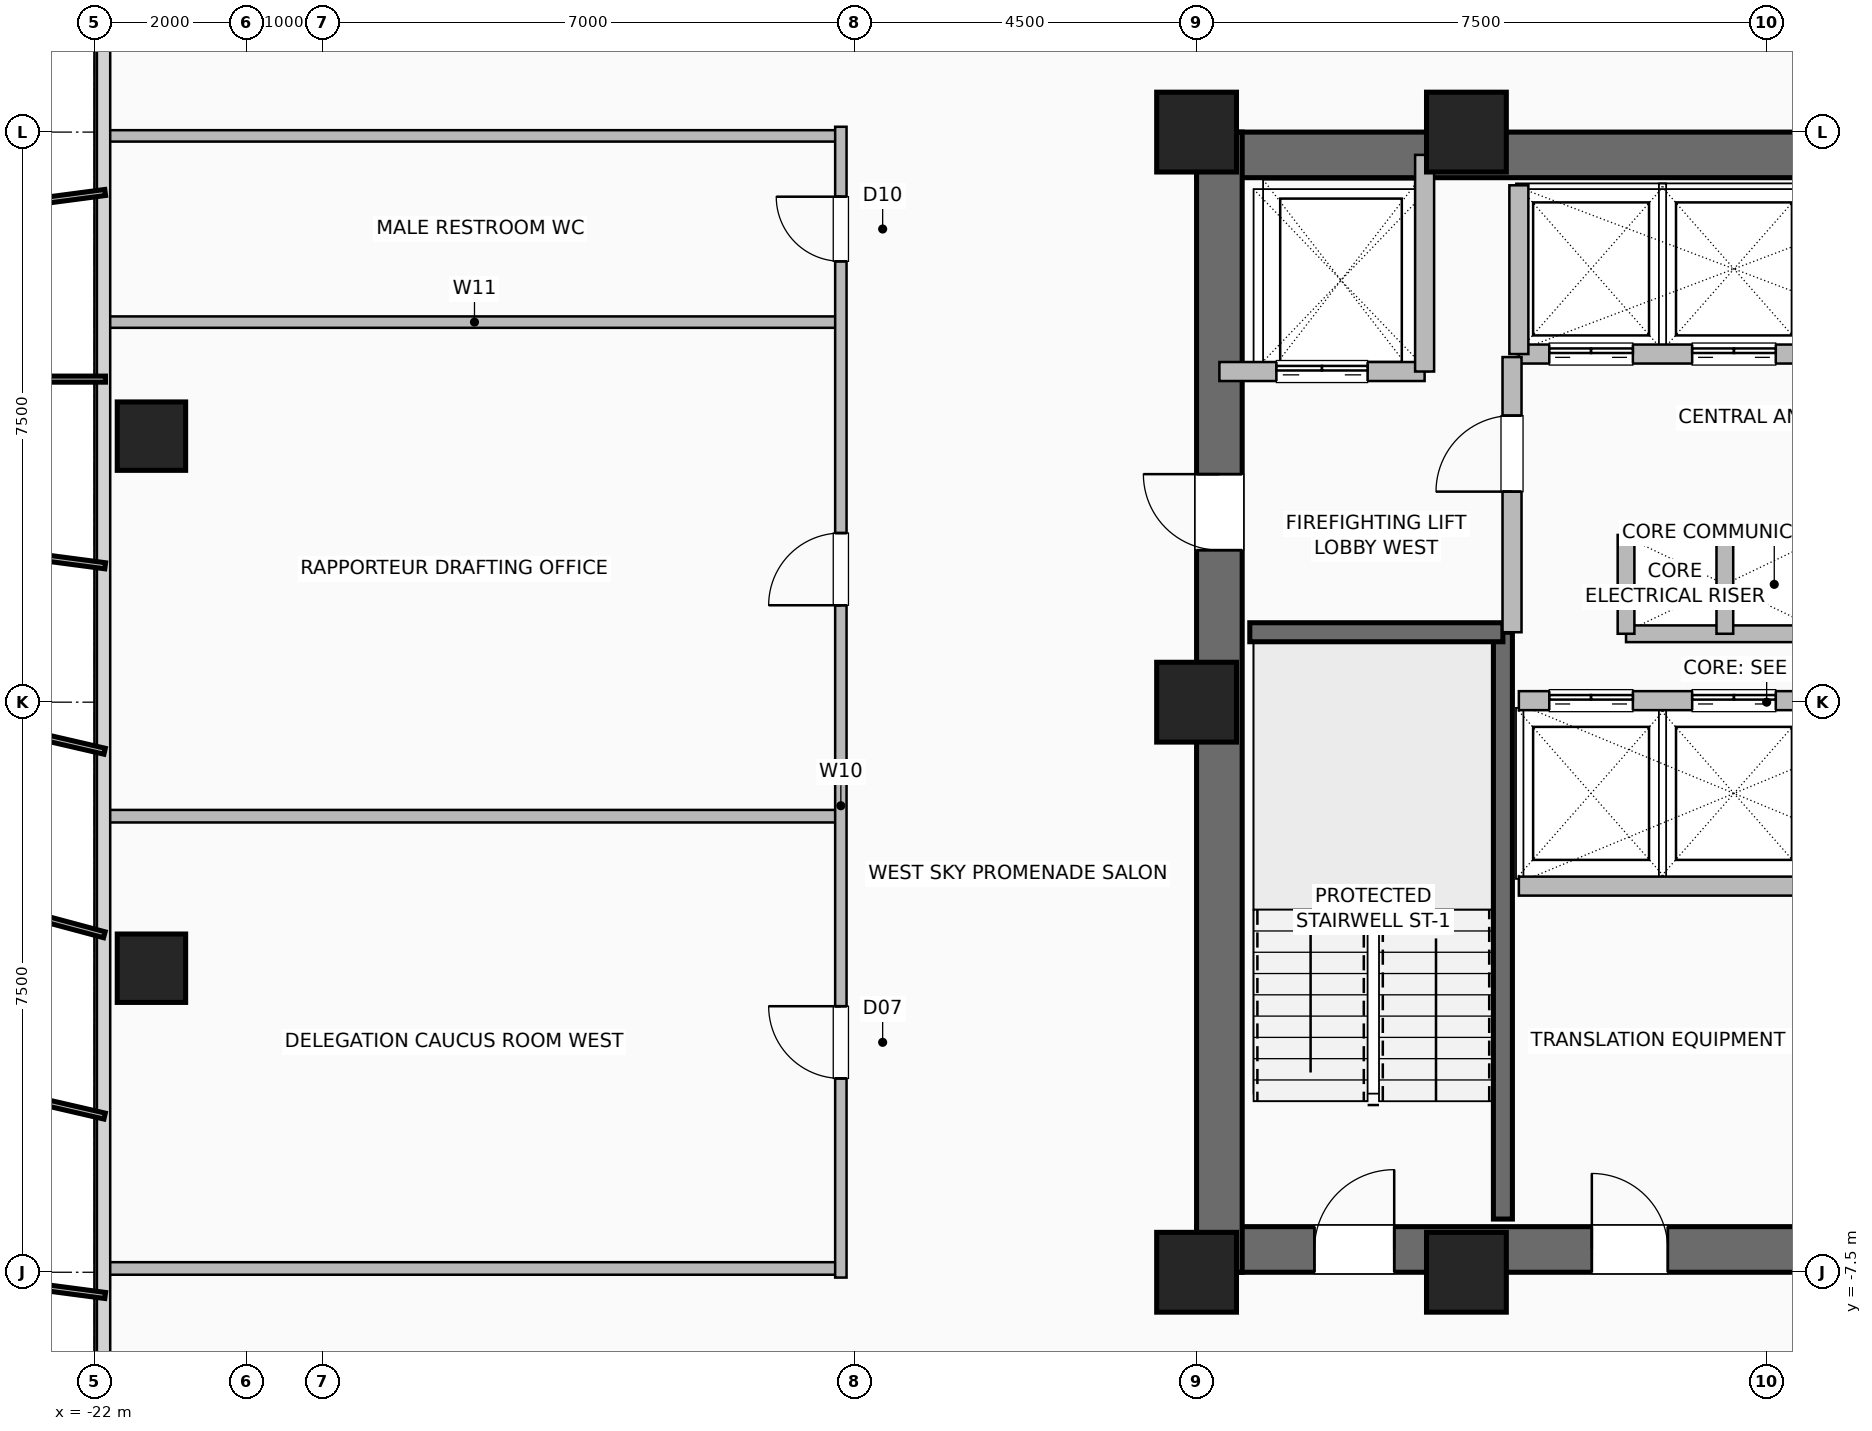
"""IFC4 building model, lengths in metres.
Left out: names, types, materials, properties, quantities, classifications, styles, units other than length and angle.
Written with IfcOpenShell. Run it as: python <this file> out.ifc"""

import sys

from ifc_helpers import new_model, si_unit, direction, frame, frame_2d, origin, origin_2d, place, context, subcontext, project, spatial, rectangle, hollow_rectangle, extrude, element, fill, save


model = new_model("IFC4")
c1 = context("Model", 3, precision=1e-05, world=origin(), true_north=direction((0.0, 1.0)))
c2 = subcontext(c1, "Body", "Model", "MODEL_VIEW")
j1 = project(units=[si_unit("LENGTHUNIT", "METRE"), si_unit("PLANEANGLEUNIT", "RADIAN")], contexts=[c1])
p1 = place(None, origin())
s1 = spatial("IfcSite", under=j1, at=p1, CompositionType="ELEMENT")
p2 = place(p1, origin())
s2 = spatial("IfcBuilding", under=s1, at=p2, CompositionType="ELEMENT")
p3 = place(p2, frame((0.0, 0.0, 104.8)))
s3 = spatial("IfcBuildingStorey", under=s2, at=p3, CompositionType="ELEMENT", Elevation=104.8)
for number, where, z_axis, x_axis in (
    (1, (-7.5, -7.5, 0.0), (0.0, 0.0, 1.0), (1.0, 0.0, 0.0)),
    (2, (-3.95, -7.5, 0.0), (0.0, 0.0, 1.0), (1.0, 0.0, 0.0)),
    (3, (-3.95, 7.5, 0.0), (0.0, 0.0, 1.0), (1.0, 0.0, 0.0)),
    (4, (-7.5, 7.5, 0.0), (0.0, 0.0, 1.0), (1.0, 0.0, 0.0)),
    (5, (-7.5, 0.0, 0.0), (0.0, 0.0, 1.0), (1.0, 0.0, 0.0)),
):
    element("IfcColumn", number, at=place(p3, frame(where, z_axis=z_axis, x_axis=x_axis)), inside=s3, PredefinedType="COLUMN", context=c2, shape_type="SweptSolid", body=[
        extrude(hollow_rectangle(XDim=1.05, YDim=1.05, WallThickness=0.05, at=origin_2d()), origin(), (0.0, 0.0, 1.0), 3.6),
    ])
for number, where, z_axis, x_axis in (
    (6, (-21.25, -3.5, 0.0), (0.0, 0.0, 1.0), (1.0, 0.0, 0.0)),
    (7, (-21.25, 3.5, 0.0), (0.0, 0.0, 1.0), (1.0, 0.0, 0.0)),
):
    element("IfcColumn", number, at=place(p3, frame(where, z_axis=z_axis, x_axis=x_axis)), inside=s3, PredefinedType="COLUMN", context=c2, shape_type="SweptSolid", body=[
        extrude(hollow_rectangle(XDim=0.9, YDim=0.9, WallThickness=0.045, at=origin_2d()), origin(), (0.0, 0.0, 1.0), 3.6),
    ])
p4 = place(p3, frame((-7.5, -7.2, 0.0), z_axis=(0.0, 0.0, 1.0), x_axis=(1.0, 0.0, 0.0)))
e8 = element("IfcWall", 8, at=p4, inside=s3, PredefinedType="SHEAR", context=c2, shape_type="SweptSolid", body=[
    extrude(rectangle(XDim=15.0, YDim=0.6, at=frame_2d((7.5, 0.0))), origin(), (0.0, 0.0, 1.0), 3.36),
])
p5 = place(p4, frame((1.55, 0.0, 0.0)))
e9 = element("IfcOpeningElement", 9, at=p5, cuts=e8, PredefinedType="OPENING", context=c2, shape_type="SweptSolid", body=[
    extrude(rectangle(XDim=1.05, YDim=2.08, at=frame_2d((0.525, 1.04))), frame((0.0, 0.31, 0.0), z_axis=(0.0, -1.0, 0.0), x_axis=(1.0, 0.0, 0.0)), (0.0, 0.0, 1.0), 0.62),
])
p6 = place(p4, frame((12.4, 0.0, 0.0)))
e10 = element("IfcOpeningElement", 10, at=p6, cuts=e8, PredefinedType="OPENING", context=c2, shape_type="SweptSolid", body=[
    extrude(rectangle(XDim=1.05, YDim=2.08, at=frame_2d((0.525, 1.04))), frame((0.0, 0.31, 0.0), z_axis=(0.0, -1.0, 0.0), x_axis=(1.0, 0.0, 0.0)), (0.0, 0.0, 1.0), 0.62),
])
p7 = place(p4, frame((5.2, 0.0, 0.0)))
e11 = element("IfcOpeningElement", 11, at=p7, cuts=e8, PredefinedType="OPENING", context=c2, shape_type="SweptSolid", body=[
    extrude(rectangle(XDim=1.0, YDim=2.08, at=frame_2d((0.5, 1.04))), frame((0.0, 0.31, 0.0), z_axis=(0.0, -1.0, 0.0), x_axis=(1.0, 0.0, 0.0)), (0.0, 0.0, 1.0), 0.62),
])
p8 = place(p4, frame((8.65, 0.0, 0.0)))
e12 = element("IfcOpeningElement", 12, at=p8, cuts=e8, PredefinedType="OPENING", context=c2, shape_type="SweptSolid", body=[
    extrude(rectangle(XDim=1.0, YDim=2.08, at=frame_2d((0.5, 1.04))), frame((0.0, 0.31, 0.0), z_axis=(0.0, -1.0, 0.0), x_axis=(1.0, 0.0, 0.0)), (0.0, 0.0, 1.0), 0.62),
])
p9 = place(p3, frame((-7.5, 7.2, 0.0), z_axis=(0.0, 0.0, 1.0), x_axis=(1.0, 0.0, 0.0)))
e13 = element("IfcWall", 13, at=p9, inside=s3, PredefinedType="SHEAR", context=c2, shape_type="SweptSolid", body=[
    extrude(rectangle(XDim=15.0, YDim=0.6, at=frame_2d((7.5, 0.0))), origin(), (0.0, 0.0, 1.0), 3.36),
])
p10 = place(p3, frame((-7.2, -7.5, 0.0), z_axis=(0.0, 0.0, 1.0), x_axis=(0.0, 1.0, 0.0)))
e14 = element("IfcWall", 14, at=p10, inside=s3, PredefinedType="SHEAR", context=c2, shape_type="SweptSolid", body=[
    extrude(rectangle(XDim=15.0, YDim=0.6, at=frame_2d((7.5, 0.0))), origin(), (0.0, 0.0, 1.0), 3.36),
])
p11 = place(p10, frame((9.5, 0.0, 0.0)))
e15 = element("IfcOpeningElement", 15, at=p11, cuts=e14, PredefinedType="OPENING", context=c2, shape_type="SweptSolid", body=[
    extrude(rectangle(XDim=1.0, YDim=2.08, at=frame_2d((0.5, 1.04))), frame((0.0, 0.31, 0.0), z_axis=(0.0, -1.0, 0.0), x_axis=(1.0, 0.0, 0.0)), (0.0, 0.0, 1.0), 0.62),
])
p12 = place(p3, frame((-3.47, -6.8, 0.0), z_axis=(0.0, 0.0, 1.0), x_axis=(0.0, 1.0, 0.0)))
e16 = element("IfcWall", 16, at=p12, inside=s3, PredefinedType="SHEAR", context=c2, shape_type="SweptSolid", body=[
    extrude(rectangle(XDim=7.72, YDim=0.25, at=frame_2d((3.86, 0.0))), origin(), (0.0, 0.0, 1.0), 3.36),
])
p13 = place(p3, frame((-6.8, 0.92, 0.0), z_axis=(0.0, 0.0, 1.0), x_axis=(1.0, 0.0, 0.0)))
e17 = element("IfcWall", 17, at=p13, inside=s3, PredefinedType="SHEAR", context=c2, shape_type="SweptSolid", body=[
    extrude(rectangle(XDim=3.33, YDim=0.25, at=frame_2d((1.665, 0.0))), origin(), (0.0, 0.0, 1.0), 3.36),
])
for number, where, z_axis, x_axis in (
    (18, (-1.85, 2.2, 0.0), (0.0, 0.0, 1.0), (1.0, 0.0, 0.0)),
    (19, (-1.85, 0.9, 0.0), (0.0, 0.0, 1.0), (1.0, 0.0, 0.0)),
):
    element("IfcWall", number, at=place(p3, frame(where, z_axis=z_axis, x_axis=x_axis)), inside=s3, PredefinedType="PARTITIONING", context=c2, shape_type="SweptSolid", body=[
        extrude(rectangle(XDim=2.6, YDim=0.22, at=frame_2d((1.3, 0.0))), origin(), (0.0, 0.0, 1.0), 3.36),
    ])
for number, where, z_axis, x_axis in (
    (20, (-0.55, 0.9, 0.0), (0.0, 0.0, 1.0), (0.0, 1.0, 0.0)),
    (21, (-1.85, 0.9, 0.0), (0.0, 0.0, 1.0), (0.0, 1.0, 0.0)),
):
    element("IfcWall", number, at=place(p3, frame(where, z_axis=z_axis, x_axis=x_axis)), inside=s3, PredefinedType="PARTITIONING", context=c2, shape_type="SweptSolid", body=[
        extrude(rectangle(XDim=1.3, YDim=0.22, at=frame_2d((0.65, 0.0))), origin(), (0.0, 0.0, 1.0), 3.36),
    ])
p14 = place(p3, frame((-3.26, 0.02, 0.0), z_axis=(0.0, 0.0, 1.0), x_axis=(1.0, 0.0, 0.0)))
e22 = element("IfcWall", 22, at=p14, inside=s3, PredefinedType="SHEAR", context=c2, shape_type="SweptSolid", body=[
    extrude(rectangle(XDim=5.64, YDim=0.25, at=frame_2d((2.82, 0.0))), origin(), (0.0, 0.0, 1.0), 3.36),
])
p15 = place(p14, frame((0.4, 0.0, 0.0)))
e23 = element("IfcOpeningElement", 23, at=p15, cuts=e22, PredefinedType="OPENING", context=c2, shape_type="SweptSolid", body=[
    extrude(rectangle(XDim=1.1, YDim=2.2, at=frame_2d((0.55, 1.1))), frame((0.0, 0.135, 0.0), z_axis=(0.0, -1.0, 0.0), x_axis=(1.0, 0.0, 0.0)), (0.0, 0.0, 1.0), 0.27),
])
p16 = place(p14, frame((2.28, 0.0, 0.0)))
e24 = element("IfcOpeningElement", 24, at=p16, cuts=e22, PredefinedType="OPENING", context=c2, shape_type="SweptSolid", body=[
    extrude(rectangle(XDim=1.1, YDim=2.2, at=frame_2d((0.55, 1.1))), frame((0.0, 0.135, 0.0), z_axis=(0.0, -1.0, 0.0), x_axis=(1.0, 0.0, 0.0)), (0.0, 0.0, 1.0), 0.27),
])
p17 = place(p14, frame((4.16, 0.0, 0.0)))
e25 = element("IfcOpeningElement", 25, at=p17, cuts=e22, PredefinedType="OPENING", context=c2, shape_type="SweptSolid", body=[
    extrude(rectangle(XDim=1.1, YDim=2.2, at=frame_2d((0.55, 1.1))), frame((0.0, 0.135, 0.0), z_axis=(0.0, -1.0, 0.0), x_axis=(1.0, 0.0, 0.0)), (0.0, 0.0, 1.0), 0.27),
])
p18 = place(p3, frame((-3.26, -2.42, 0.0), z_axis=(0.0, 0.0, 1.0), x_axis=(1.0, 0.0, 0.0)))
e26 = element("IfcWall", 26, at=p18, inside=s3, PredefinedType="SHEAR", context=c2, shape_type="SweptSolid", body=[
    extrude(rectangle(XDim=5.64, YDim=0.25, at=frame_2d((2.82, 0.0))), origin(), (0.0, 0.0, 1.0), 3.36),
])
p19 = place(p3, frame((-3.26, 4.58, 0.0), z_axis=(0.0, 0.0, 1.0), x_axis=(1.0, 0.0, 0.0)))
e27 = element("IfcWall", 27, at=p19, inside=s3, PredefinedType="SHEAR", context=c2, shape_type="SweptSolid", body=[
    extrude(rectangle(XDim=5.64, YDim=0.25, at=frame_2d((2.82, 0.0))), origin(), (0.0, 0.0, 1.0), 3.36),
])
p20 = place(p19, frame((0.4, 0.0, 0.0)))
e28 = element("IfcOpeningElement", 28, at=p20, cuts=e27, PredefinedType="OPENING", context=c2, shape_type="SweptSolid", body=[
    extrude(rectangle(XDim=1.1, YDim=2.2, at=frame_2d((0.55, 1.1))), frame((0.0, 0.135, 0.0), z_axis=(0.0, -1.0, 0.0), x_axis=(1.0, 0.0, 0.0)), (0.0, 0.0, 1.0), 0.27),
])
p21 = place(p19, frame((2.28, 0.0, 0.0)))
e29 = element("IfcOpeningElement", 29, at=p21, cuts=e27, PredefinedType="OPENING", context=c2, shape_type="SweptSolid", body=[
    extrude(rectangle(XDim=1.1, YDim=2.2, at=frame_2d((0.55, 1.1))), frame((0.0, 0.135, 0.0), z_axis=(0.0, -1.0, 0.0), x_axis=(1.0, 0.0, 0.0)), (0.0, 0.0, 1.0), 0.27),
])
p22 = place(p19, frame((4.16, 0.0, 0.0)))
e30 = element("IfcOpeningElement", 30, at=p22, cuts=e27, PredefinedType="OPENING", context=c2, shape_type="SweptSolid", body=[
    extrude(rectangle(XDim=1.1, YDim=2.2, at=frame_2d((0.55, 1.1))), frame((0.0, 0.135, 0.0), z_axis=(0.0, -1.0, 0.0), x_axis=(1.0, 0.0, 0.0)), (0.0, 0.0, 1.0), 0.27),
])
p23 = place(p3, frame((-3.26, 4.58, 0.0), z_axis=(0.0, 0.0, 1.0), x_axis=(0.0, 1.0, 0.0)))
e31 = element("IfcWall", 31, at=p23, inside=s3, PredefinedType="SHEAR", context=c2, shape_type="SweptSolid", body=[
    extrude(rectangle(XDim=2.22, YDim=0.25, at=frame_2d((1.11, 0.0))), origin(), (0.0, 0.0, 1.0), 3.36),
])
p24 = place(p3, frame((-7.2, 4.35, 0.0), z_axis=(0.0, 0.0, 1.0), x_axis=(1.0, 0.0, 0.0)))
e32 = element("IfcWall", 32, at=p24, inside=s3, PredefinedType="SHEAR", context=c2, shape_type="SweptSolid", body=[
    extrude(rectangle(XDim=2.7, YDim=0.25, at=frame_2d((1.35, 0.0))), origin(), (0.0, 0.0, 1.0), 3.36),
])
p25 = place(p24, frame((0.75, 0.0, 0.0)))
e33 = element("IfcOpeningElement", 33, at=p25, cuts=e32, PredefinedType="OPENING", context=c2, shape_type="SweptSolid", body=[
    extrude(rectangle(XDim=1.2, YDim=2.2, at=frame_2d((0.6, 1.1))), frame((0.0, 0.135, 0.0), z_axis=(0.0, -1.0, 0.0), x_axis=(1.0, 0.0, 0.0)), (0.0, 0.0, 1.0), 0.27),
])
p26 = place(p3, frame((-4.5, 4.35, 0.0), z_axis=(0.0, 0.0, 1.0), x_axis=(0.0, 1.0, 0.0)))
e34 = element("IfcWall", 34, at=p26, inside=s3, PredefinedType="SHEAR", context=c2, shape_type="SweptSolid", body=[
    extrude(rectangle(XDim=2.85, YDim=0.25, at=frame_2d((1.425, 0.0))), origin(), (0.0, 0.0, 1.0), 3.36),
])
p27 = place(p3, frame((-3.35, 0.92, 0.0), z_axis=(0.0, 0.0, 1.0), x_axis=(0.0, 1.0, 0.0)))
e35 = element("IfcWall", 35, at=p27, inside=s3, PredefinedType="SHEAR", context=c2, shape_type="SweptSolid", body=[
    extrude(rectangle(XDim=3.62, YDim=0.25, at=frame_2d((1.81, 0.0))), origin(), (0.0, 0.0, 1.0), 3.36),
])
p28 = place(p27, frame((1.85, 0.0, 0.0)))
e36 = element("IfcOpeningElement", 36, at=p28, cuts=e35, PredefinedType="OPENING", context=c2, shape_type="SweptSolid", body=[
    extrude(rectangle(XDim=1.0, YDim=2.08, at=frame_2d((0.5, 1.04))), frame((0.0, 0.135, 0.0), z_axis=(0.0, -1.0, 0.0), x_axis=(1.0, 0.0, 0.0)), (0.0, 0.0, 1.0), 0.27),
])
for number, where, z_axis, x_axis in (
    (37, (-21.82, -7.45, 0.0), (0.0, 0.0, 1.0), (1.0, 0.0, 0.0)),
    (38, (-21.82, -1.5, 0.0), (0.0, 0.0, 1.0), (1.0, 0.0, 0.0)),
):
    element("IfcWall", number, at=place(p3, frame(where, z_axis=z_axis, x_axis=x_axis)), inside=s3, PredefinedType="PLUMBINGWALL", context=c2, shape_type="SweptSolid", body=[
        extrude(rectangle(XDim=9.64, YDim=0.165, at=frame_2d((4.82, 0.0))), origin(), (0.0, 0.0, 1.0), 3.36),
    ])
for number, where, z_axis, x_axis in (
    (39, (-21.82, 5.0, 0.0), (0.0, 0.0, 1.0), (1.0, 0.0, 0.0)),
    (40, (-21.82, 7.45, 0.0), (0.0, 0.0, 1.0), (1.0, 0.0, 0.0)),
):
    element("IfcWall", number, at=place(p3, frame(where, z_axis=z_axis, x_axis=x_axis)), inside=s3, PredefinedType="PARTITIONING", context=c2, shape_type="SweptSolid", body=[
        extrude(rectangle(XDim=9.64, YDim=0.15, at=frame_2d((4.82, 0.0))), origin(), (0.0, 0.0, 1.0), 3.36),
    ])
p29 = place(p3, frame((-12.18, -7.57, 0.0), z_axis=(0.0, 0.0, 1.0), x_axis=(0.0, 1.0, 0.0)))
e41 = element("IfcWall", 41, at=p29, inside=s3, PredefinedType="PARTITIONING", context=c2, shape_type="SweptSolid", body=[
    extrude(rectangle(XDim=15.14, YDim=0.15, at=frame_2d((7.57, 0.0))), origin(), (0.0, 0.0, 1.0), 3.36),
])
p30 = place(p29, frame((2.62, 0.0, 0.0)))
e42 = element("IfcOpeningElement", 42, at=p30, cuts=e41, PredefinedType="OPENING", context=c2, shape_type="SweptSolid", body=[
    extrude(rectangle(XDim=0.95, YDim=2.06, at=frame_2d((0.475, 1.03))), frame((0.0, 0.085, 0.0), z_axis=(0.0, -1.0, 0.0), x_axis=(1.0, 0.0, 0.0)), (0.0, 0.0, 1.0), 0.17),
])
p31 = place(p29, frame((8.845, 0.0, 0.0)))
e43 = element("IfcOpeningElement", 43, at=p31, cuts=e41, PredefinedType="OPENING", context=c2, shape_type="SweptSolid", body=[
    extrude(rectangle(XDim=0.95, YDim=2.06, at=frame_2d((0.475, 1.03))), frame((0.0, 0.085, 0.0), z_axis=(0.0, -1.0, 0.0), x_axis=(1.0, 0.0, 0.0)), (0.0, 0.0, 1.0), 0.17),
])
p32 = place(p29, frame((13.37, 0.0, 0.0)))
e44 = element("IfcOpeningElement", 44, at=p32, cuts=e41, PredefinedType="OPENING", context=c2, shape_type="SweptSolid", body=[
    extrude(rectangle(XDim=0.85, YDim=2.05, at=frame_2d((0.425, 1.025))), frame((0.0, 0.085, 0.0), z_axis=(0.0, -1.0, 0.0), x_axis=(1.0, 0.0, 0.0)), (0.0, 0.0, 1.0), 0.17),
])
p33 = place(p5, origin())
e45 = element("IfcDoor", 45, at=p33, inside=s3, OperationType="SINGLE_SWING_RIGHT", PredefinedType="DOOR", context=c2, shape_type="SweptSolid", body=[
    extrude(rectangle(XDim=1.05, YDim=2.08, at=frame_2d((0.525, 1.04))), frame((0.0, 0.025, 0.0), z_axis=(0.0, -1.0, 0.0), x_axis=(1.0, 0.0, 0.0)), (0.0, 0.0, 1.0), 0.05),
])
fill(e9, e45)
p34 = place(p11, origin())
e46 = element("IfcDoor", 46, at=p34, inside=s3, OperationType="SINGLE_SWING_RIGHT", PredefinedType="DOOR", context=c2, shape_type="SweptSolid", body=[
    extrude(rectangle(XDim=1.0, YDim=2.08, at=frame_2d((0.5, 1.04))), frame((0.0, 0.025, 0.0), z_axis=(0.0, -1.0, 0.0), x_axis=(1.0, 0.0, 0.0)), (0.0, 0.0, 1.0), 0.05),
])
fill(e15, e46)
p35 = place(p7, origin())
e47 = element("IfcDoor", 47, at=p35, inside=s3, OperationType="SINGLE_SWING_LEFT", PredefinedType="DOOR", context=c2, shape_type="SweptSolid", body=[
    extrude(rectangle(XDim=1.0, YDim=2.08, at=frame_2d((0.5, 1.04))), frame((0.0, 0.025, 0.0), z_axis=(0.0, -1.0, 0.0), x_axis=(1.0, 0.0, 0.0)), (0.0, 0.0, 1.0), 0.05),
])
fill(e11, e47)
p36 = place(p15, origin())
e48 = element("IfcDoor", 48, at=p36, inside=s3, OperationType="DOUBLE_DOOR_SLIDING", PredefinedType="DOOR", context=c2, shape_type="SweptSolid", body=[
    extrude(rectangle(XDim=1.1, YDim=2.2, at=frame_2d((0.55, 1.1))), frame((0.0, 0.025, 0.0), z_axis=(0.0, -1.0, 0.0), x_axis=(1.0, 0.0, 0.0)), (0.0, 0.0, 1.0), 0.05),
])
fill(e23, e48)
p37 = place(p16, origin())
e49 = element("IfcDoor", 49, at=p37, inside=s3, OperationType="DOUBLE_DOOR_SLIDING", PredefinedType="DOOR", context=c2, shape_type="SweptSolid", body=[
    extrude(rectangle(XDim=1.1, YDim=2.2, at=frame_2d((0.55, 1.1))), frame((0.0, 0.025, 0.0), z_axis=(0.0, -1.0, 0.0), x_axis=(1.0, 0.0, 0.0)), (0.0, 0.0, 1.0), 0.05),
])
fill(e24, e49)
p38 = place(p20, origin())
e50 = element("IfcDoor", 50, at=p38, inside=s3, OperationType="DOUBLE_DOOR_SLIDING", PredefinedType="DOOR", context=c2, shape_type="SweptSolid", body=[
    extrude(rectangle(XDim=1.1, YDim=2.2, at=frame_2d((0.55, 1.1))), frame((0.0, 0.025, 0.0), z_axis=(0.0, -1.0, 0.0), x_axis=(1.0, 0.0, 0.0)), (0.0, 0.0, 1.0), 0.05),
])
fill(e28, e50)
p39 = place(p21, origin())
e51 = element("IfcDoor", 51, at=p39, inside=s3, OperationType="DOUBLE_DOOR_SLIDING", PredefinedType="DOOR", context=c2, shape_type="SweptSolid", body=[
    extrude(rectangle(XDim=1.1, YDim=2.2, at=frame_2d((0.55, 1.1))), frame((0.0, 0.025, 0.0), z_axis=(0.0, -1.0, 0.0), x_axis=(1.0, 0.0, 0.0)), (0.0, 0.0, 1.0), 0.05),
])
fill(e29, e51)
p40 = place(p25, origin())
e52 = element("IfcDoor", 52, at=p40, inside=s3, OperationType="DOUBLE_DOOR_SLIDING", PredefinedType="DOOR", context=c2, shape_type="SweptSolid", body=[
    extrude(rectangle(XDim=1.2, YDim=2.2, at=frame_2d((0.6, 1.1))), frame((0.0, 0.025, 0.0), z_axis=(0.0, -1.0, 0.0), x_axis=(1.0, 0.0, 0.0)), (0.0, 0.0, 1.0), 0.05),
])
fill(e33, e52)
p41 = place(p28, origin())
e53 = element("IfcDoor", 53, at=p41, inside=s3, OperationType="SINGLE_SWING_LEFT", PredefinedType="DOOR", context=c2, shape_type="SweptSolid", body=[
    extrude(rectangle(XDim=1.0, YDim=2.08, at=frame_2d((0.5, 1.04))), frame((0.0, 0.025, 0.0), z_axis=(0.0, -1.0, 0.0), x_axis=(1.0, 0.0, 0.0)), (0.0, 0.0, 1.0), 0.05),
])
fill(e36, e53)
p42 = place(p30, origin())
e54 = element("IfcDoor", 54, at=p42, inside=s3, OperationType="SINGLE_SWING_RIGHT", PredefinedType="DOOR", context=c2, shape_type="SweptSolid", body=[
    extrude(rectangle(XDim=0.95, YDim=2.06, at=frame_2d((0.475, 1.03))), frame((0.0, 0.025, 0.0), z_axis=(0.0, -1.0, 0.0), x_axis=(1.0, 0.0, 0.0)), (0.0, 0.0, 1.0), 0.05),
])
fill(e42, e54)
p43 = place(p31, origin())
e55 = element("IfcDoor", 55, at=p43, inside=s3, OperationType="SINGLE_SWING_LEFT", PredefinedType="DOOR", context=c2, shape_type="SweptSolid", body=[
    extrude(rectangle(XDim=0.95, YDim=2.06, at=frame_2d((0.475, 1.03))), frame((0.0, 0.025, 0.0), z_axis=(0.0, -1.0, 0.0), x_axis=(1.0, 0.0, 0.0)), (0.0, 0.0, 1.0), 0.05),
])
fill(e43, e55)
p44 = place(p32, origin())
e56 = element("IfcDoor", 56, at=p44, inside=s3, OperationType="SINGLE_SWING_RIGHT", PredefinedType="DOOR", context=c2, shape_type="SweptSolid", body=[
    extrude(rectangle(XDim=0.85, YDim=2.05, at=frame_2d((0.425, 1.025))), frame((0.0, 0.025, 0.0), z_axis=(0.0, -1.0, 0.0), x_axis=(1.0, 0.0, 0.0)), (0.0, 0.0, 1.0), 0.05),
])
fill(e44, e56)
save(model, sys.argv[1])
